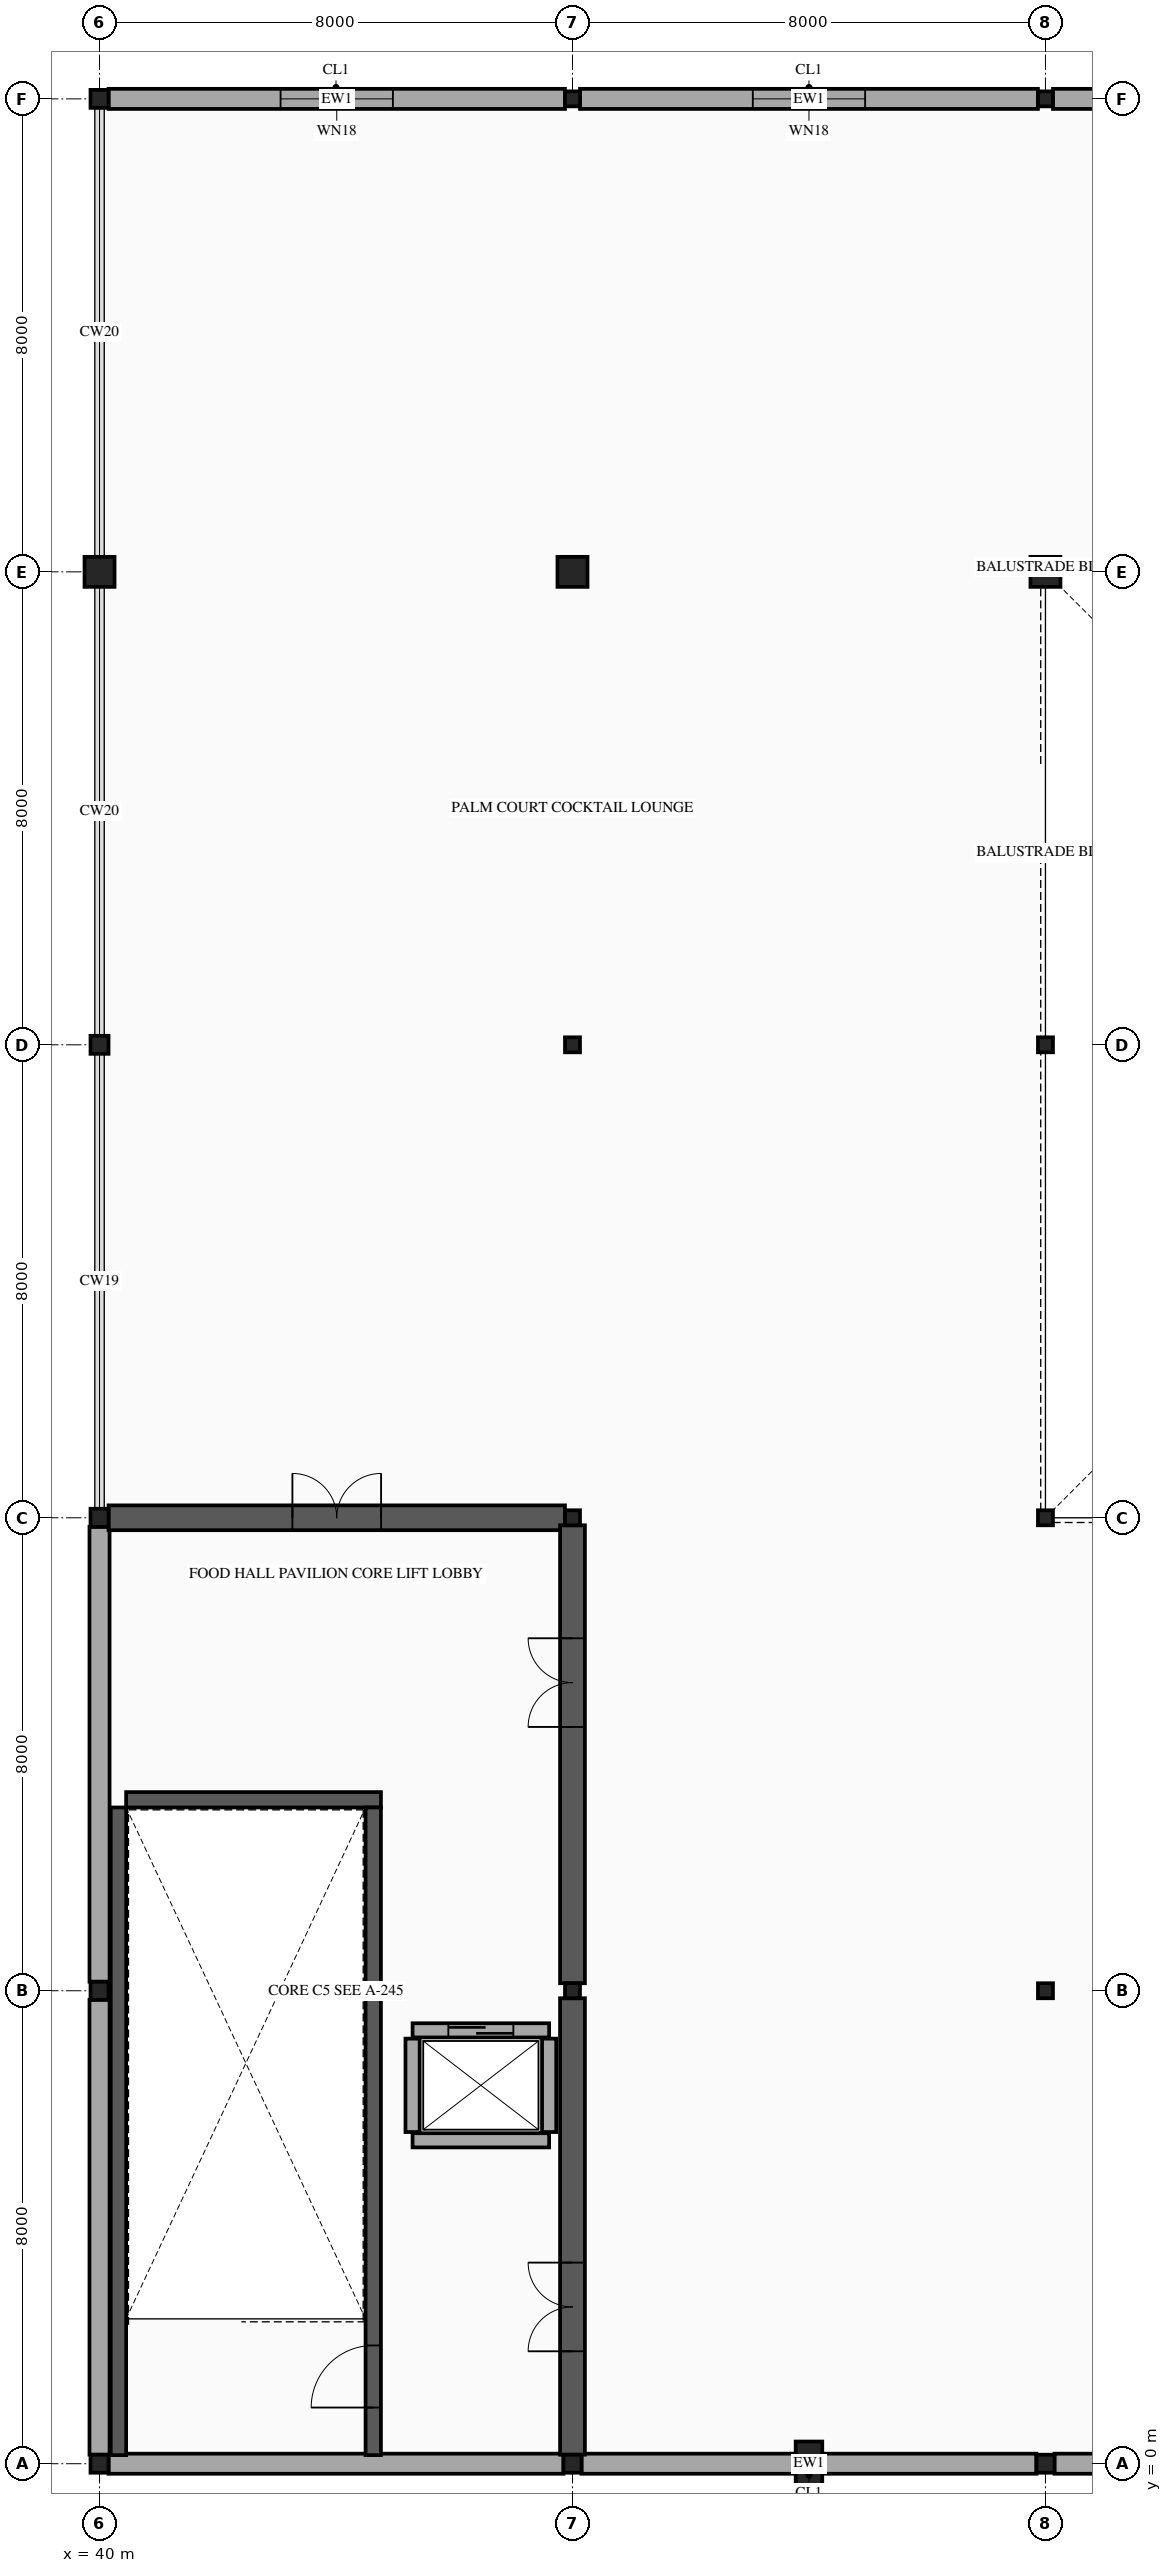
"""IFC4 building model, lengths in metres.
Left out: names, types, materials, properties, quantities, classifications, styles, units other than length and angle.
Written with IfcOpenShell. Run it as: python <this file> out.ifc"""

import sys

from ifc_helpers import new_model, si_unit, direction, frame, frame_2d, origin, origin_2d, place, context, subcontext, project, spatial, rectangle, hollow_rectangle, hollow_circle, extrude, element, fill, save


model = new_model("IFC4")
c1 = context("Model", 3, precision=1e-05, world=origin(), true_north=direction((0.0, 1.0)))
c2 = subcontext(c1, "Body", "Model", "MODEL_VIEW")
j1 = project(units=[si_unit("LENGTHUNIT", "METRE"), si_unit("PLANEANGLEUNIT", "RADIAN")], contexts=[c1])
p1 = place(None, origin())
s1 = spatial("IfcSite", under=j1, at=p1, CompositionType="ELEMENT")
p2 = place(p1, origin())
s2 = spatial("IfcBuilding", under=s1, at=p2, CompositionType="ELEMENT")
p3 = place(p2, frame((0.0, 0.0, 5.6)))
s3 = spatial("IfcBuildingStorey", under=s2, at=p3, CompositionType="ELEMENT", Elevation=5.6)
for number, where, z_axis, x_axis in (
    (1, (40.0, 0.0, 0.0), (0.0, 0.0, 1.0), (1.0, 0.0, 0.0)),
    (2, (40.0, 8.0, 0.0), (0.0, 0.0, 1.0), (1.0, 0.0, 0.0)),
    (3, (40.0, 16.0, 0.0), (0.0, 0.0, 1.0), (1.0, 0.0, 0.0)),
    (4, (40.0, 24.0, 0.0), (0.0, 0.0, 1.0), (1.0, 0.0, 0.0)),
):
    element("IfcColumn", number, at=place(p3, frame(where, z_axis=z_axis, x_axis=x_axis)), inside=s3, PredefinedType="COLUMN", context=c2, shape_type="SweptSolid", body=[
        extrude(hollow_rectangle(XDim=0.305, YDim=0.305, WallThickness=0.012, InnerFilletRadius=0.012, OuterFilletRadius=0.024, at=origin_2d()), origin(), (0.0, 0.0, 1.0), 4.8),
    ])
p4 = place(p3, frame((40.0, 32.0, 0.0), z_axis=(0.0, 0.0, 1.0), x_axis=(1.0, 0.0, 0.0)))
e5 = element("IfcColumn", 5, at=p4, inside=s3, PredefinedType="COLUMN", context=c2, shape_type="SweptSolid", body=[
    extrude(hollow_circle(Radius=0.254, WallThickness=0.012, at=origin_2d()), origin(), (0.0, 0.0, 1.0), 4.8),
])
for number, where, z_axis, x_axis in (
    (6, (40.0, 40.0, 0.0), (0.0, 0.0, 1.0), (1.0, 0.0, 0.0)),
    (7, (48.0, 0.0, 0.0), (0.0, 0.0, 1.0), (1.0, 0.0, 0.0)),
):
    element("IfcColumn", number, at=place(p3, frame(where, z_axis=z_axis, x_axis=x_axis)), inside=s3, PredefinedType="COLUMN", context=c2, shape_type="SweptSolid", body=[
        extrude(hollow_rectangle(XDim=0.305, YDim=0.305, WallThickness=0.012, InnerFilletRadius=0.012, OuterFilletRadius=0.024, at=origin_2d()), origin(), (0.0, 0.0, 1.0), 4.8),
    ])
for number, where, z_axis, x_axis in (
    (8, (48.0, 8.0, 0.0), (0.0, 0.0, 1.0), (1.0, 0.0, 0.0)),
    (9, (48.0, 16.0, 0.0), (0.0, 0.0, 1.0), (1.0, 0.0, 0.0)),
    (10, (48.0, 24.0, 0.0), (0.0, 0.0, 1.0), (1.0, 0.0, 0.0)),
):
    element("IfcColumn", number, at=place(p3, frame(where, z_axis=z_axis, x_axis=x_axis)), inside=s3, PredefinedType="COLUMN", context=c2, shape_type="SweptSolid", body=[
        extrude(hollow_rectangle(XDim=0.254, YDim=0.254, WallThickness=0.009, InnerFilletRadius=0.009, OuterFilletRadius=0.018, at=origin_2d()), origin(), (0.0, 0.0, 1.0), 4.8),
    ])
p5 = place(p3, frame((48.0, 32.0, 0.0), z_axis=(0.0, 0.0, 1.0), x_axis=(1.0, 0.0, 0.0)))
e11 = element("IfcColumn", 11, at=p5, inside=s3, PredefinedType="COLUMN", context=c2, shape_type="SweptSolid", body=[
    extrude(hollow_circle(Radius=0.254, WallThickness=0.012, at=origin_2d()), origin(), (0.0, 0.0, 1.0), 4.8),
])
p6 = place(p3, frame((48.0, 40.0, 0.0), z_axis=(0.0, 0.0, 1.0), x_axis=(1.0, 0.0, 0.0)))
e12 = element("IfcColumn", 12, at=p6, inside=s3, PredefinedType="COLUMN", context=c2, shape_type="SweptSolid", body=[
    extrude(hollow_rectangle(XDim=0.254, YDim=0.254, WallThickness=0.009, InnerFilletRadius=0.009, OuterFilletRadius=0.018, at=origin_2d()), origin(), (0.0, 0.0, 1.0), 4.8),
])
p7 = place(p3, frame((56.0, 0.0, 0.0), z_axis=(0.0, 0.0, 1.0), x_axis=(1.0, 0.0, 0.0)))
e13 = element("IfcColumn", 13, at=p7, inside=s3, PredefinedType="COLUMN", context=c2, shape_type="SweptSolid", body=[
    extrude(hollow_rectangle(XDim=0.305, YDim=0.305, WallThickness=0.012, InnerFilletRadius=0.012, OuterFilletRadius=0.024, at=origin_2d()), origin(), (0.0, 0.0, 1.0), 4.8),
])
for number, where, z_axis, x_axis in (
    (14, (56.0, 8.0, 0.0), (0.0, 0.0, 1.0), (1.0, 0.0, 0.0)),
    (15, (56.0, 16.0, 0.0), (0.0, 0.0, 1.0), (1.0, 0.0, 0.0)),
    (16, (56.0, 24.0, 0.0), (0.0, 0.0, 1.0), (1.0, 0.0, 0.0)),
):
    element("IfcColumn", number, at=place(p3, frame(where, z_axis=z_axis, x_axis=x_axis)), inside=s3, PredefinedType="COLUMN", context=c2, shape_type="SweptSolid", body=[
        extrude(hollow_rectangle(XDim=0.254, YDim=0.254, WallThickness=0.009, InnerFilletRadius=0.009, OuterFilletRadius=0.018, at=origin_2d()), origin(), (0.0, 0.0, 1.0), 4.8),
    ])
p8 = place(p3, frame((56.0, 32.0, 0.0), z_axis=(0.0, 0.0, 1.0), x_axis=(1.0, 0.0, 0.0)))
e17 = element("IfcColumn", 17, at=p8, inside=s3, PredefinedType="COLUMN", context=c2, shape_type="SweptSolid", body=[
    extrude(hollow_circle(Radius=0.254, WallThickness=0.012, at=origin_2d()), origin(), (0.0, 0.0, 1.0), 4.8),
])
p9 = place(p3, frame((56.0, 40.0, 0.0), z_axis=(0.0, 0.0, 1.0), x_axis=(1.0, 0.0, 0.0)))
e18 = element("IfcColumn", 18, at=p9, inside=s3, PredefinedType="COLUMN", context=c2, shape_type="SweptSolid", body=[
    extrude(hollow_rectangle(XDim=0.254, YDim=0.254, WallThickness=0.009, InnerFilletRadius=0.009, OuterFilletRadius=0.018, at=origin_2d()), origin(), (0.0, 0.0, 1.0), 4.8),
])
p10 = place(p3, frame((52.0, 0.0, 0.0), z_axis=(0.0, 0.0, 1.0), x_axis=(1.0, 0.0, 0.0)))
e19 = element("IfcColumn", 19, at=p10, inside=s3, PredefinedType="PILASTER", context=c2, shape_type="SweptSolid", body=[
    extrude(rectangle(XDim=0.45, YDim=0.75, at=origin_2d()), origin(), (0.0, 0.0, 1.0), 4.8),
])
p11 = place(p3, frame((63.847, 0.0, 0.0), z_axis=(0.0, 0.0, 1.0), x_axis=(-1.0, 0.0, 0.0)))
e20 = element("IfcWall", 20, at=p11, inside=s3, PredefinedType="STANDARD", context=c2, shape_type="SweptSolid", body=[
    extrude(rectangle(XDim=7.695, YDim=0.34, at=frame_2d((3.847, 0.0))), origin(), (0.0, 0.0, 1.0), 3.78),
])
p12 = place(p11, frame((2.897, 0.0, 0.8)))
e21 = element("IfcOpeningElement", 21, at=p12, cuts=e20, PredefinedType="OPENING", context=c2, shape_type="SweptSolid", body=[
    extrude(rectangle(XDim=1.9, YDim=1.65, at=frame_2d((0.95, 0.825))), frame((0.0, 0.18, 0.0), z_axis=(0.0, -1.0, 0.0), x_axis=(1.0, 0.0, 0.0)), (0.0, 0.0, 1.0), 0.36),
])
for number, where, z_axis, x_axis in (
    (22, (55.847, 0.0, 0.0), (0.0, 0.0, 1.0), (-1.0, 0.0, 0.0)),
    (23, (47.847, 0.0, 0.0), (0.0, 0.0, 1.0), (-1.0, 0.0, 0.0)),
    (24, (40.0, 0.153, 0.0), (0.0, 0.0, 1.0), (0.0, 1.0, 0.0)),
    (25, (40.0, 8.153, 0.0), (0.0, 0.0, 1.0), (0.0, 1.0, 0.0)),
):
    element("IfcWall", number, at=place(p3, frame(where, z_axis=z_axis, x_axis=x_axis)), inside=s3, PredefinedType="STANDARD", context=c2, shape_type="SweptSolid", body=[
        extrude(rectangle(XDim=7.695, YDim=0.34, at=frame_2d((3.847, 0.0))), origin(), (0.0, 0.0, 1.0), 3.78),
    ])
p13 = place(p3, frame((40.153, 40.0, 0.0), z_axis=(0.0, 0.0, 1.0), x_axis=(1.0, 0.0, 0.0)))
e26 = element("IfcWall", 26, at=p13, inside=s3, PredefinedType="STANDARD", context=c2, shape_type="SweptSolid", body=[
    extrude(rectangle(XDim=7.72, YDim=0.34, at=frame_2d((3.86, 0.0))), origin(), (0.0, 0.0, 1.0), 3.78),
])
p14 = place(p13, frame((2.91, 0.0, 0.8)))
e27 = element("IfcOpeningElement", 27, at=p14, cuts=e26, PredefinedType="OPENING", context=c2, shape_type="SweptSolid", body=[
    extrude(rectangle(XDim=1.9, YDim=1.65, at=frame_2d((0.95, 0.825))), frame((0.0, 0.18, 0.0), z_axis=(0.0, -1.0, 0.0), x_axis=(1.0, 0.0, 0.0)), (0.0, 0.0, 1.0), 0.36),
])
p15 = place(p3, frame((48.127, 40.0, 0.0), z_axis=(0.0, 0.0, 1.0), x_axis=(1.0, 0.0, 0.0)))
e28 = element("IfcWall", 28, at=p15, inside=s3, PredefinedType="STANDARD", context=c2, shape_type="SweptSolid", body=[
    extrude(rectangle(XDim=7.746, YDim=0.34, at=frame_2d((3.873, 0.0))), origin(), (0.0, 0.0, 1.0), 3.78),
])
p16 = place(p15, frame((2.923, 0.0, 0.8)))
e29 = element("IfcOpeningElement", 29, at=p16, cuts=e28, PredefinedType="OPENING", context=c2, shape_type="SweptSolid", body=[
    extrude(rectangle(XDim=1.9, YDim=1.65, at=frame_2d((0.95, 0.825))), frame((0.0, 0.18, 0.0), z_axis=(0.0, -1.0, 0.0), x_axis=(1.0, 0.0, 0.0)), (0.0, 0.0, 1.0), 0.36),
])
p17 = place(p3, frame((56.127, 40.0, 0.0), z_axis=(0.0, 0.0, 1.0), x_axis=(1.0, 0.0, 0.0)))
e30 = element("IfcWall", 30, at=p17, inside=s3, PredefinedType="STANDARD", context=c2, shape_type="SweptSolid", body=[
    extrude(rectangle(XDim=7.746, YDim=0.34, at=frame_2d((3.873, 0.0))), origin(), (0.0, 0.0, 1.0), 3.78),
])
p18 = place(p17, frame((2.923, 0.0, 0.8)))
e31 = element("IfcOpeningElement", 31, at=p18, cuts=e30, PredefinedType="OPENING", context=c2, shape_type="SweptSolid", body=[
    extrude(rectangle(XDim=1.9, YDim=1.65, at=frame_2d((0.95, 0.825))), frame((0.0, 0.18, 0.0), z_axis=(0.0, -1.0, 0.0), x_axis=(1.0, 0.0, 0.0)), (0.0, 0.0, 1.0), 0.36),
])
p19 = place(p3, frame((40.45, 11.23, 0.0), z_axis=(0.0, 0.0, 1.0), x_axis=(1.0, 0.0, 0.0)))
e32 = element("IfcWall", 32, at=p19, inside=s3, PredefinedType="SHEAR", context=c2, shape_type="SweptSolid", body=[
    extrude(rectangle(XDim=4.31, YDim=0.26, at=frame_2d((2.155, 0.0))), origin(), (0.0, 0.0, 1.0), 4.58),
])
p20 = place(p3, frame((40.32, 0.145, 0.0), z_axis=(0.0, 0.0, 1.0), x_axis=(0.0, 1.0, 0.0)))
e33 = element("IfcWall", 33, at=p20, inside=s3, PredefinedType="SHEAR", context=c2, shape_type="SweptSolid", body=[
    extrude(rectangle(XDim=10.955, YDim=0.26, at=frame_2d((5.478, 0.0))), origin(), (0.0, 0.0, 1.0), 4.58),
])
p21 = place(p3, frame((44.63, 0.145, 0.0), z_axis=(0.0, 0.0, 1.0), x_axis=(0.0, 1.0, 0.0)))
e34 = element("IfcWall", 34, at=p21, inside=s3, PredefinedType="SHEAR", context=c2, shape_type="SweptSolid", body=[
    extrude(rectangle(XDim=10.955, YDim=0.26, at=frame_2d((5.478, 0.0))), origin(), (0.0, 0.0, 1.0), 4.58),
])
p22 = place(p21, frame((0.805, 0.0, 0.0)))
e35 = element("IfcOpeningElement", 35, at=p22, cuts=e34, PredefinedType="OPENING", context=c2, shape_type="SweptSolid", body=[
    extrude(rectangle(XDim=1.05, YDim=2.15, at=frame_2d((0.525, 1.075))), frame((0.0, 0.14, 0.0), z_axis=(0.0, -1.0, 0.0), x_axis=(1.0, 0.0, 0.0)), (0.0, 0.0, 1.0), 0.28),
])
p23 = place(p3, frame((40.153, 16.0, 0.0), z_axis=(0.0, 0.0, 1.0), x_axis=(1.0, 0.0, 0.0)))
e36 = element("IfcWall", 36, at=p23, inside=s3, PredefinedType="SHEAR", context=c2, shape_type="SweptSolid", body=[
    extrude(rectangle(XDim=7.72, YDim=0.42, at=frame_2d((3.86, 0.0))), origin(), (0.0, 0.0, 1.0), 4.58),
])
p24 = place(p23, frame((3.11, 0.0, 0.0)))
e37 = element("IfcOpeningElement", 37, at=p24, cuts=e36, PredefinedType="OPENING", context=c2, shape_type="SweptSolid", body=[
    extrude(rectangle(XDim=1.5, YDim=2.15, at=frame_2d((0.75, 1.075))), frame((0.0, 0.22, 0.0), z_axis=(0.0, -1.0, 0.0), x_axis=(1.0, 0.0, 0.0)), (0.0, 0.0, 1.0), 0.44),
])
p25 = place(p3, frame((48.0, 0.153, 0.0), z_axis=(0.0, 0.0, 1.0), x_axis=(0.0, 1.0, 0.0)))
e38 = element("IfcWall", 38, at=p25, inside=s3, PredefinedType="SHEAR", context=c2, shape_type="SweptSolid", body=[
    extrude(rectangle(XDim=7.72, YDim=0.42, at=frame_2d((3.86, 0.0))), origin(), (0.0, 0.0, 1.0), 4.58),
])
p26 = place(p25, frame((1.749, 0.0, 0.0)))
e39 = element("IfcOpeningElement", 39, at=p26, cuts=e38, PredefinedType="OPENING", context=c2, shape_type="SweptSolid", body=[
    extrude(rectangle(XDim=1.5, YDim=2.15, at=frame_2d((0.75, 1.075))), frame((0.0, 0.22, 0.0), z_axis=(0.0, -1.0, 0.0), x_axis=(1.0, 0.0, 0.0)), (0.0, 0.0, 1.0), 0.44),
])
p27 = place(p3, frame((48.0, 8.127, 0.0), z_axis=(0.0, 0.0, 1.0), x_axis=(0.0, 1.0, 0.0)))
e40 = element("IfcWall", 40, at=p27, inside=s3, PredefinedType="SHEAR", context=c2, shape_type="SweptSolid", body=[
    extrude(rectangle(XDim=7.746, YDim=0.42, at=frame_2d((3.873, 0.0))), origin(), (0.0, 0.0, 1.0), 4.58),
])
p28 = place(p27, frame((4.335, 0.0, 0.0)))
e41 = element("IfcOpeningElement", 41, at=p28, cuts=e40, PredefinedType="OPENING", context=c2, shape_type="SweptSolid", body=[
    extrude(rectangle(XDim=1.5, YDim=2.15, at=frame_2d((0.75, 1.075))), frame((0.0, 0.22, 0.0), z_axis=(0.0, -1.0, 0.0), x_axis=(1.0, 0.0, 0.0)), (0.0, 0.0, 1.0), 0.44),
])
p29 = place(p3, frame((45.295, 7.33, 0.0), z_axis=(0.0, 0.0, 1.0), x_axis=(1.0, 0.0, 0.0)))
e42 = element("IfcWall", 42, at=p29, inside=s3, PredefinedType="PARTITIONING", context=c2, shape_type="SweptSolid", body=[
    extrude(rectangle(XDim=2.31, YDim=0.24, at=frame_2d((1.155, 0.0))), origin(), (0.0, 0.0, 1.0), 4.58),
])
p30 = place(p29, frame((0.605, 0.0, 0.0)))
e43 = element("IfcOpeningElement", 43, at=p30, cuts=e42, PredefinedType="OPENING", context=c2, shape_type="SweptSolid", body=[
    extrude(rectangle(XDim=1.1, YDim=2.15, at=frame_2d((0.55, 1.075))), frame((0.0, 0.13, 0.0), z_axis=(0.0, -1.0, 0.0), x_axis=(1.0, 0.0, 0.0)), (0.0, 0.0, 1.0), 0.26),
])
p31 = place(p3, frame((45.295, 5.47, 0.0), z_axis=(0.0, 0.0, 1.0), x_axis=(1.0, 0.0, 0.0)))
e44 = element("IfcWall", 44, at=p31, inside=s3, PredefinedType="PARTITIONING", context=c2, shape_type="SweptSolid", body=[
    extrude(rectangle(XDim=2.31, YDim=0.24, at=frame_2d((1.155, 0.0))), origin(), (0.0, 0.0, 1.0), 4.58),
])
for number, where, z_axis, x_axis in (
    (45, (45.295, 5.61, 0.0), (0.0, 0.0, 1.0), (0.0, 1.0, 0.0)),
    (46, (47.605, 5.61, 0.0), (0.0, 0.0, 1.0), (0.0, 1.0, 0.0)),
):
    element("IfcWall", number, at=place(p3, frame(where, z_axis=z_axis, x_axis=x_axis)), inside=s3, PredefinedType="PARTITIONING", context=c2, shape_type="SweptSolid", body=[
        extrude(rectangle(XDim=1.58, YDim=0.24, at=frame_2d((0.79, 0.0))), origin(), (0.0, 0.0, 1.0), 4.58),
    ])
p32 = place(p14, origin())
e47 = element("IfcWindow", 47, at=p32, inside=s3, PartitioningType="DOUBLE_PANEL_VERTICAL", PredefinedType="WINDOW", context=c2, shape_type="SweptSolid", body=[
    extrude(rectangle(XDim=1.9, YDim=1.65, at=frame_2d((0.95, 0.825))), frame((0.0, 0.03, 0.0), z_axis=(0.0, -1.0, 0.0), x_axis=(1.0, 0.0, 0.0)), (0.0, 0.0, 1.0), 0.06),
])
fill(e27, e47)
p33 = place(p16, origin())
e48 = element("IfcWindow", 48, at=p33, inside=s3, PartitioningType="DOUBLE_PANEL_VERTICAL", PredefinedType="WINDOW", context=c2, shape_type="SweptSolid", body=[
    extrude(rectangle(XDim=1.9, YDim=1.65, at=frame_2d((0.95, 0.825))), frame((0.0, 0.03, 0.0), z_axis=(0.0, -1.0, 0.0), x_axis=(1.0, 0.0, 0.0)), (0.0, 0.0, 1.0), 0.06),
])
fill(e29, e48)
p34 = place(p22, origin())
e49 = element("IfcDoor", 49, at=p34, inside=s3, OperationType="SINGLE_SWING_LEFT", PredefinedType="DOOR", context=c2, shape_type="SweptSolid", body=[
    extrude(rectangle(XDim=1.05, YDim=2.15, at=frame_2d((0.525, 1.075))), frame((0.0, 0.025, 0.0), z_axis=(0.0, -1.0, 0.0), x_axis=(1.0, 0.0, 0.0)), (0.0, 0.0, 1.0), 0.05),
])
fill(e35, e49)
p35 = place(p24, origin())
e50 = element("IfcDoor", 50, at=p35, inside=s3, OperationType="DOUBLE_DOOR_SINGLE_SWING", PredefinedType="DOOR", context=c2, shape_type="SweptSolid", body=[
    extrude(rectangle(XDim=1.5, YDim=2.15, at=frame_2d((0.75, 1.075))), frame((0.0, 0.025, 0.0), z_axis=(0.0, -1.0, 0.0), x_axis=(1.0, 0.0, 0.0)), (0.0, 0.0, 1.0), 0.05),
])
fill(e37, e50)
p36 = place(p26, origin())
e51 = element("IfcDoor", 51, at=p36, inside=s3, OperationType="DOUBLE_DOOR_SINGLE_SWING", PredefinedType="DOOR", context=c2, shape_type="SweptSolid", body=[
    extrude(rectangle(XDim=1.5, YDim=2.15, at=frame_2d((0.75, 1.075))), frame((0.0, 0.025, 0.0), z_axis=(0.0, -1.0, 0.0), x_axis=(1.0, 0.0, 0.0)), (0.0, 0.0, 1.0), 0.05),
])
fill(e39, e51)
p37 = place(p28, origin())
e52 = element("IfcDoor", 52, at=p37, inside=s3, OperationType="DOUBLE_DOOR_SINGLE_SWING", PredefinedType="DOOR", context=c2, shape_type="SweptSolid", body=[
    extrude(rectangle(XDim=1.5, YDim=2.15, at=frame_2d((0.75, 1.075))), frame((0.0, 0.025, 0.0), z_axis=(0.0, -1.0, 0.0), x_axis=(1.0, 0.0, 0.0)), (0.0, 0.0, 1.0), 0.05),
])
fill(e41, e52)
p38 = place(p30, origin())
e53 = element("IfcDoor", 53, at=p38, inside=s3, OperationType="SLIDING_TO_LEFT", PredefinedType="DOOR", context=c2, shape_type="SweptSolid", body=[
    extrude(rectangle(XDim=1.1, YDim=2.15, at=frame_2d((0.55, 1.075))), frame((0.0, 0.025, 0.0), z_axis=(0.0, -1.0, 0.0), x_axis=(1.0, 0.0, 0.0)), (0.0, 0.0, 1.0), 0.05),
])
fill(e43, e53)
save(model, sys.argv[1])
